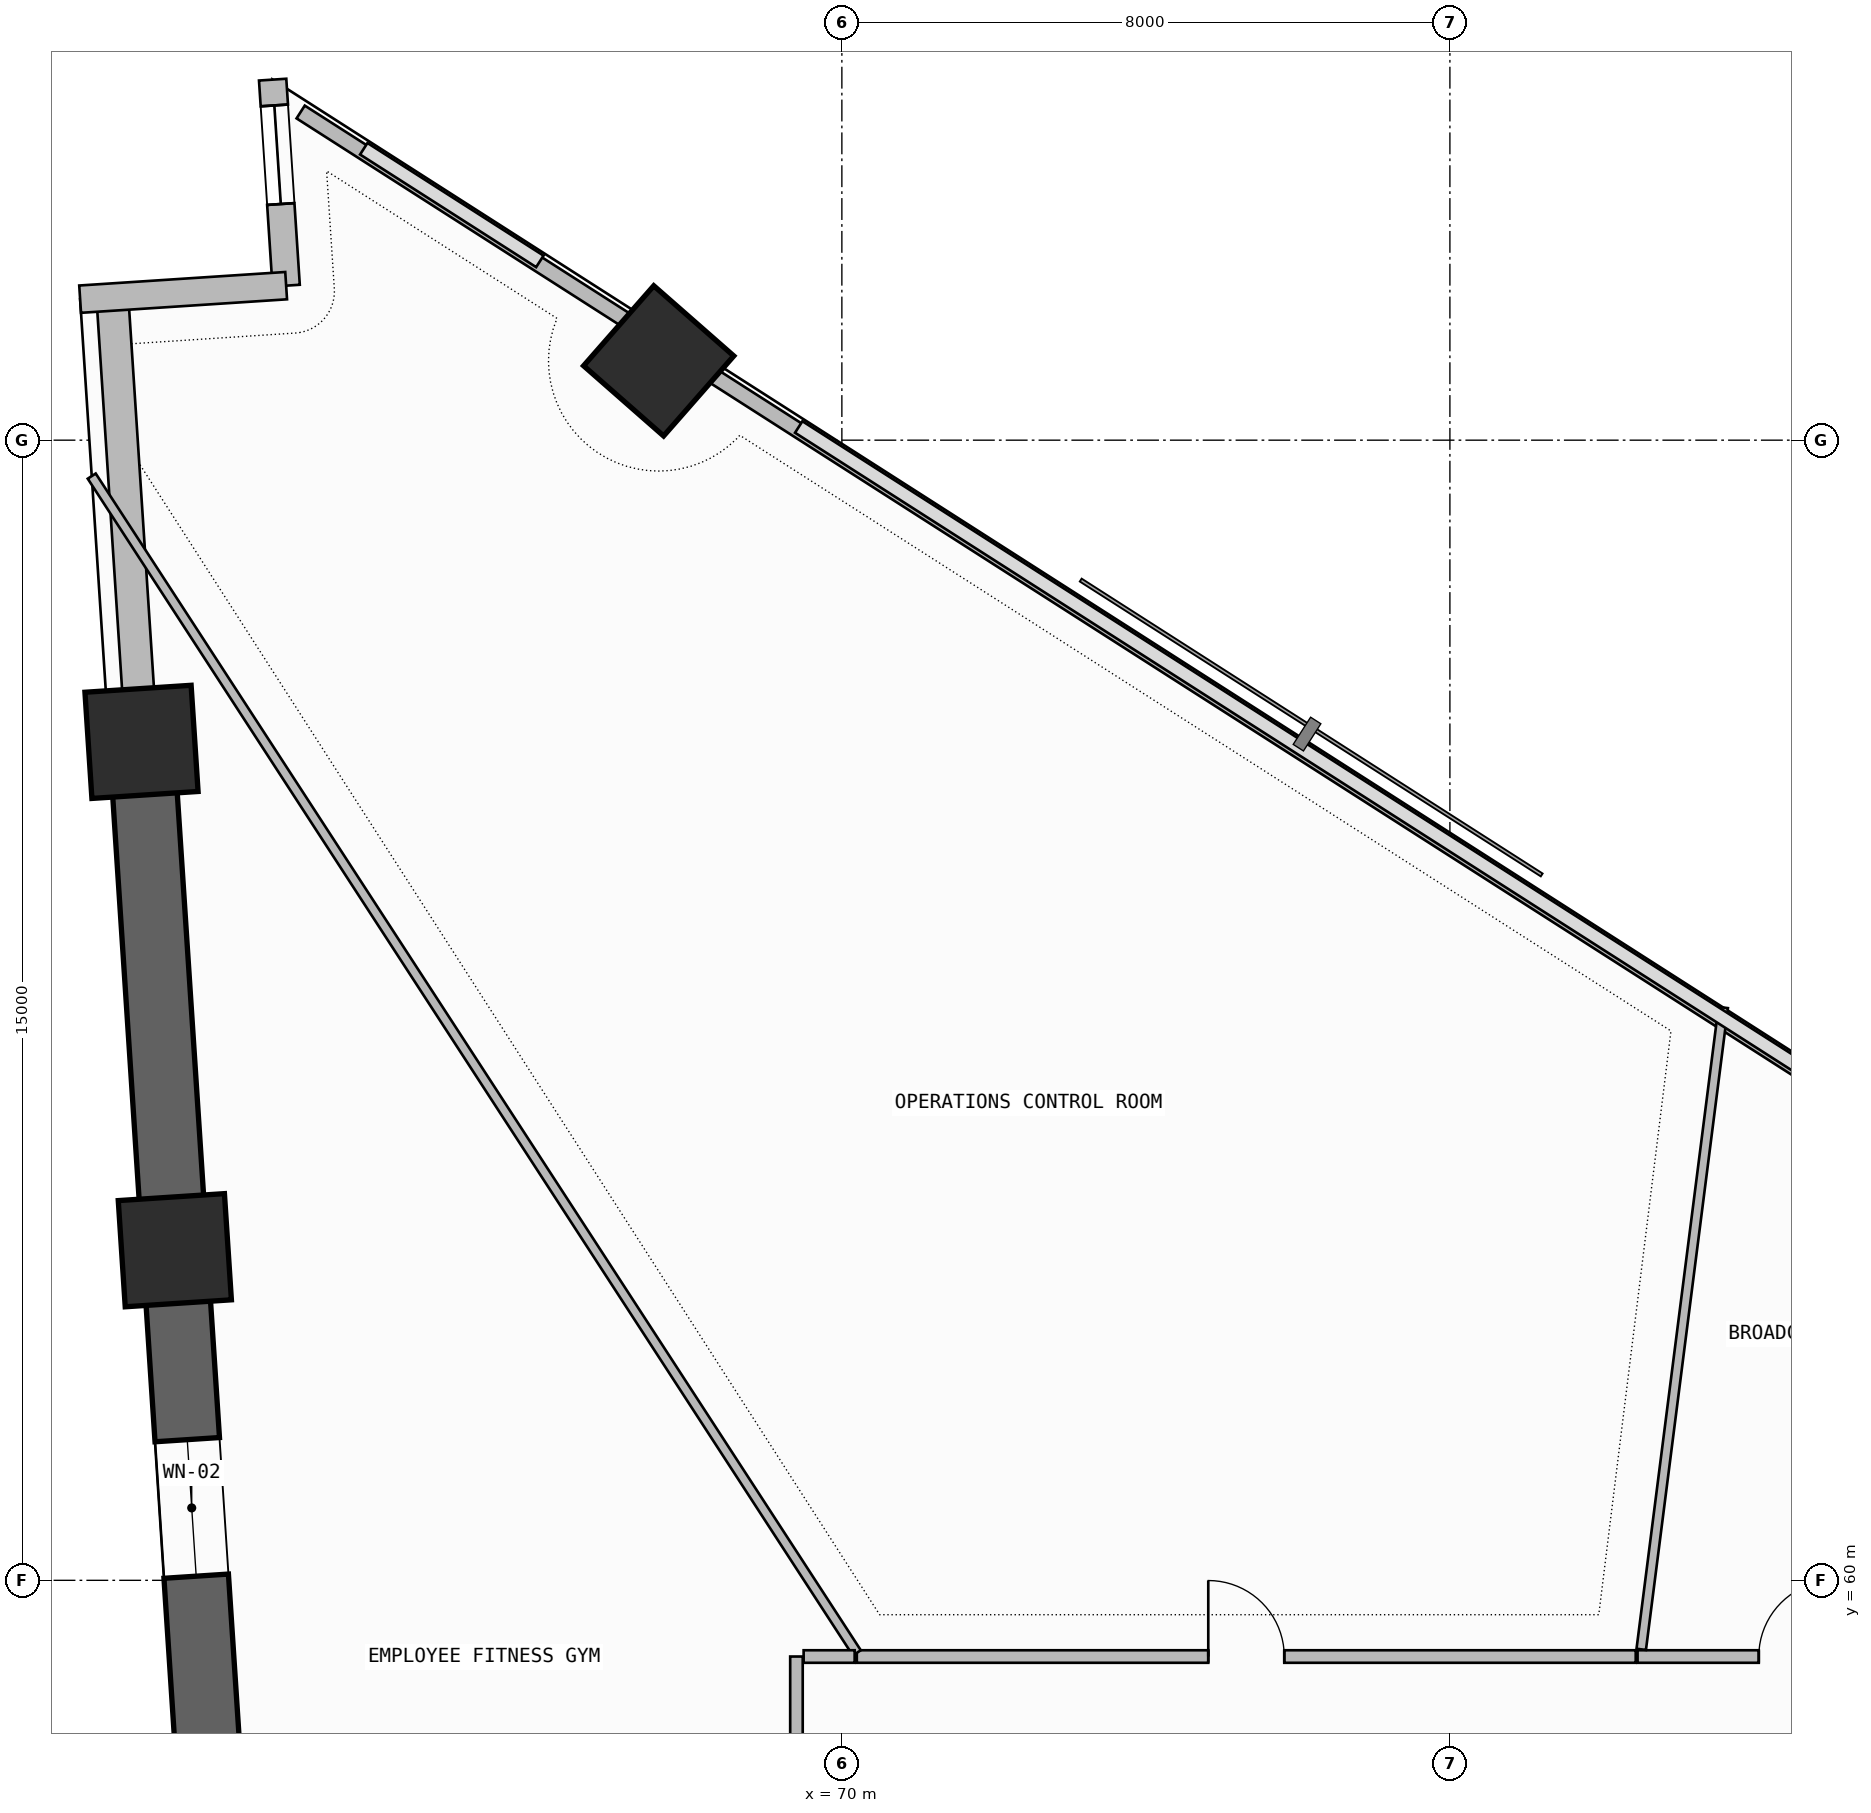
"""IFC4 building model, lengths in metres.
Left out: names, types, materials, properties, quantities, classifications, styles, units other than length and angle.
Written with IfcOpenShell. Run it as: python <this file> out.ifc"""

import sys

from ifc_helpers import new_model, si_unit, direction, frame, frame_2d, origin, origin_2d, place, context, subcontext, project, spatial, rectangle, extrude, element, fill, save


model = new_model("IFC4")
c1 = context("Model", 3, precision=1e-05, world=origin(), true_north=direction((0.0, 1.0)))
c2 = subcontext(c1, "Body", "Model", "MODEL_VIEW")
j1 = project(units=[si_unit("LENGTHUNIT", "METRE"), si_unit("PLANEANGLEUNIT", "RADIAN")], contexts=[c1])
p1 = place(None, origin())
s1 = spatial("IfcSite", under=j1, at=p1, CompositionType="ELEMENT")
p2 = place(p1, origin())
s2 = spatial("IfcBuilding", under=s1, at=p2, CompositionType="ELEMENT")
p3 = place(p2, frame((0.0, 0.0, 77.7)))
s3 = spatial("IfcBuildingStorey", under=s2, at=p3, CompositionType="ELEMENT", Elevation=77.7)
for number, where, z_axis, x_axis in (
    (1, (67.59, 76.043, 0.0), (0.0, 0.0, 1.0), (0.659, 0.752, 0.0)),
    (2, (60.785, 71.031, 0.0), (0.0, 0.0, 1.0), (-0.065, 0.998, 0.0)),
    (3, (61.224, 64.343, 0.0), (0.0, 0.0, 1.0), (-0.065, 0.998, 0.0)),
):
    element("IfcColumn", number, at=place(p3, frame(where, z_axis=z_axis, x_axis=x_axis)), inside=s3, PredefinedType="COLUMN", context=c2, shape_type="SweptSolid", body=[
        extrude(rectangle(XDim=1.4, YDim=1.4, at=origin_2d()), origin(), (0.0, 0.0, 1.0), 3.6),
    ])
p4 = place(p3, frame((60.402, 76.883, 0.0), z_axis=(0.0, 0.0, 1.0), x_axis=(0.065402662459, -0.997858953832, 0.0)))
e4 = element("IfcWall", 4, at=p4, inside=s3, PredefinedType="SOLIDWALL", context=c2, shape_type="SweptSolid", body=[
    extrude(rectangle(XDim=5.864, YDim=0.42, at=frame_2d((2.932, 0.0))), origin(), (0.0, 0.0, 1.0), 2.725),
])
p5 = place(p3, frame((60.785, 71.031, -0.26), z_axis=(0.0, 0.0, 1.0), x_axis=(0.065409824833, -0.997858484363, 0.0)))
e5 = element("IfcWall", 5, at=p5, inside=s3, PredefinedType="SHEAR", context=c2, shape_type="SweptSolid", body=[
    extrude(rectangle(XDim=21.783, YDim=0.85, at=frame_2d((10.891, 0.0))), origin(), (0.0, 0.0, 1.0), 3.6),
])
p6 = place(p5, frame((9.2, 0.0, 1.2)))
e6 = element("IfcOpeningElement", 6, at=p6, cuts=e5, PredefinedType="OPENING", context=c2, shape_type="SweptSolid", body=[
    extrude(rectangle(XDim=1.8, YDim=0.9, at=frame_2d((0.9, 0.45))), frame((0.0, 0.435, 0.0), z_axis=(0.0, -1.0, 0.0), x_axis=(1.0, 0.0, 0.0)), (0.0, 0.0, 1.0), 0.87),
])
p7 = place(p3, frame((62.511, 79.743, 0.0), z_axis=(0.0, 0.0, 1.0), x_axis=(0.065337885661, -0.997863197386, 0.0)))
e7 = element("IfcWall", 7, at=p7, inside=s3, PredefinedType="SOLIDWALL", context=c2, shape_type="SweptSolid", body=[
    extrude(rectangle(XDim=2.717, YDim=0.36, at=frame_2d((1.358, 0.0))), origin(), (0.0, 0.0, 1.0), 3.34),
])
p8 = place(p7, frame((0.34, 0.0, 0.45)))
e8 = element("IfcOpeningElement", 8, at=p8, cuts=e7, PredefinedType="OPENING", context=c2, shape_type="SweptSolid", body=[
    extrude(rectangle(XDim=1.3, YDim=2.4, at=frame_2d((0.65, 1.2))), frame((0.0, 0.19, 0.0), z_axis=(0.0, -1.0, 0.0), x_axis=(1.0, 0.0, 0.0)), (0.0, 0.0, 1.0), 0.38),
])
p9 = place(p3, frame((62.688, 77.033, 0.0), z_axis=(0.0, 0.0, 1.0), x_axis=(-0.99785694905, -0.065433242561, 0.0)))
e9 = element("IfcWall", 9, at=p9, inside=s3, PredefinedType="SOLIDWALL", context=c2, shape_type="SweptSolid", body=[
    extrude(rectangle(XDim=2.716, YDim=0.36, at=frame_2d((1.358, 0.0))), origin(), (0.0, 0.0, 1.0), 3.34),
])
p10 = place(p3, frame((84.682, 65.372, 0.0), z_axis=(0.0, 0.0, 1.0), x_axis=(-0.842418773655, 0.538823356763, 0.0)))
e10 = element("IfcWall", 10, at=p10, inside=s3, PredefinedType="PARAPET", context=c2, shape_type="SweptSolid", body=[
    extrude(rectangle(XDim=19.612, YDim=0.2, at=frame_2d((9.806, 0.0))), origin(), (0.0, 0.0, 1.0), 1.15),
])
p11 = place(p3, frame((67.257, 76.518, 0.0), z_axis=(0.0, 0.0, 1.0), x_axis=(-0.842403631411, 0.538847030042, 0.0)))
e11 = element("IfcWall", 11, at=p11, inside=s3, PredefinedType="PARAPET", context=c2, shape_type="SweptSolid", body=[
    extrude(rectangle(XDim=5.196, YDim=0.2, at=frame_2d((2.598, 0.0))), origin(), (0.0, 0.0, 1.0), 1.15),
])
p12 = place(p3, frame((88.209, 58.998, 0.0), z_axis=(0.0, 0.0, 1.0), x_axis=(-1.0, 0.0, 0.0)))
e12 = element("IfcWall", 12, at=p12, inside=s3, PredefinedType="PARTITIONING", context=c2, shape_type="SweptSolid", body=[
    extrude(rectangle(XDim=7.74, YDim=0.165, at=frame_2d((3.87, 0.0))), origin(), (0.0, 0.0, 1.0), 2.725),
])
p13 = place(p12, frame((5.146, 0.0, 0.0)))
e13 = element("IfcOpeningElement", 13, at=p13, cuts=e12, PredefinedType="OPENING", context=c2, shape_type="SweptSolid", body=[
    extrude(rectangle(XDim=1.0, YDim=2.2, at=frame_2d((0.5, 1.1))), frame((0.0, 0.093, 0.0), z_axis=(0.0, -1.0, 0.0), x_axis=(1.0, 0.0, 0.0)), (0.0, 0.0, 1.0), 0.185),
])
p14 = place(p3, frame((80.517, 59.092, 0.0), z_axis=(0.0, 0.0, 1.0), x_axis=(0.126709943005, 0.991939811855, 0.0)))
e14 = element("IfcWall", 14, at=p14, inside=s3, PredefinedType="PARTITIONING", context=c2, shape_type="SweptSolid", body=[
    extrude(rectangle(XDim=8.512, YDim=0.125, at=frame_2d((4.256, 0.0))), origin(), (0.0, 0.0, 1.0), 2.875),
])
p15 = place(p3, frame((80.445, 58.998, 0.0), z_axis=(0.0, 0.0, 1.0), x_axis=(-1.0, 0.0, 0.0)))
e15 = element("IfcWall", 15, at=p15, inside=s3, PredefinedType="PARTITIONING", context=c2, shape_type="SweptSolid", body=[
    extrude(rectangle(XDim=10.248, YDim=0.165, at=frame_2d((5.124, 0.0))), origin(), (0.0, 0.0, 1.0), 2.725),
])
p16 = place(p15, frame((4.624, 0.0, 0.0)))
e16 = element("IfcOpeningElement", 16, at=p16, cuts=e15, PredefinedType="OPENING", context=c2, shape_type="SweptSolid", body=[
    extrude(rectangle(XDim=1.0, YDim=2.2, at=frame_2d((0.5, 1.1))), frame((0.0, 0.093, 0.0), z_axis=(0.0, -1.0, 0.0), x_axis=(1.0, 0.0, 0.0)), (0.0, 0.0, 1.0), 0.185),
])
p17 = place(p3, frame((70.197, 59.046, 0.0), z_axis=(0.0, 0.0, 1.0), x_axis=(-0.54511427763, 0.838361750275, 0.0)))
e17 = element("IfcWall", 17, at=p17, inside=s3, PredefinedType="PARTITIONING", context=c2, shape_type="SweptSolid", body=[
    extrude(rectangle(XDim=18.467, YDim=0.125, at=frame_2d((9.233, 0.0))), origin(), (0.0, 0.0, 1.0), 2.725),
])
p18 = place(p3, frame((69.403, 58.998, 0.0), z_axis=(0.0, 0.0, 1.0), x_axis=(0.0, -1.0, 0.0)))
e18 = element("IfcWall", 18, at=p18, inside=s3, PredefinedType="PARTITIONING", context=c2, shape_type="SweptSolid", body=[
    extrude(rectangle(XDim=10.431, YDim=0.165, at=frame_2d((5.215, 0.0))), origin(), (0.0, 0.0, 1.0), 2.725),
])
p19 = place(p18, frame((4.716, 0.0, 0.0)))
e19 = element("IfcOpeningElement", 19, at=p19, cuts=e18, PredefinedType="OPENING", context=c2, shape_type="SweptSolid", body=[
    extrude(rectangle(XDim=1.0, YDim=2.2, at=frame_2d((0.5, 1.1))), frame((0.0, 0.093, 0.0), z_axis=(0.0, -1.0, 0.0), x_axis=(1.0, 0.0, 0.0)), (0.0, 0.0, 1.0), 0.185),
])
p20 = place(p3, frame((70.168, 58.998, 0.0), z_axis=(0.0, 0.0, 1.0), x_axis=(-1.0, 0.0, 0.0)))
e20 = element("IfcWall", 20, at=p20, inside=s3, PredefinedType="PARTITIONING", context=c2, shape_type="SweptSolid", body=[
    extrude(rectangle(XDim=0.671, YDim=0.165, at=frame_2d((0.335, 0.0))), origin(), (0.0, 0.0, 1.0), 2.725),
])
p21 = place(p6, origin())
e21 = element("IfcWindow", 21, at=p21, inside=s3, PartitioningType="SINGLE_PANEL", PredefinedType="WINDOW", context=c2, shape_type="SweptSolid", body=[
    extrude(rectangle(XDim=1.8, YDim=0.9, at=frame_2d((0.9, 0.45))), frame((0.0, 0.03, 0.0), z_axis=(0.0, -1.0, 0.0), x_axis=(1.0, 0.0, 0.0)), (0.0, 0.0, 1.0), 0.06),
])
fill(e6, e21)
p22 = place(p8, origin())
e22 = element("IfcWindow", 22, at=p22, inside=s3, PartitioningType="SINGLE_PANEL", PredefinedType="WINDOW", context=c2, shape_type="SweptSolid", body=[
    extrude(rectangle(XDim=1.3, YDim=2.4, at=frame_2d((0.65, 1.2))), frame((0.0, 0.03, 0.0), z_axis=(0.0, -1.0, 0.0), x_axis=(1.0, 0.0, 0.0)), (0.0, 0.0, 1.0), 0.06),
])
fill(e8, e22)
p23 = place(p13, frame((1.0, 0.0, 0.0), z_axis=(0.0, 0.0, 1.0), x_axis=(-1.0, 0.0, 0.0)))
e23 = element("IfcDoor", 23, at=p23, inside=s3, OperationType="SINGLE_SWING_RIGHT", PredefinedType="DOOR", context=c2, shape_type="SweptSolid", body=[
    extrude(rectangle(XDim=1.0, YDim=2.2, at=frame_2d((0.5, 1.1))), frame((0.0, 0.025, 0.0), z_axis=(0.0, -1.0, 0.0), x_axis=(1.0, 0.0, 0.0)), (0.0, 0.0, 1.0), 0.05),
])
fill(e13, e23)
p24 = place(p16, frame((1.0, 0.0, 0.0), z_axis=(0.0, 0.0, 1.0), x_axis=(-1.0, 0.0, 0.0)))
e24 = element("IfcDoor", 24, at=p24, inside=s3, OperationType="SINGLE_SWING_LEFT", PredefinedType="DOOR", context=c2, shape_type="SweptSolid", body=[
    extrude(rectangle(XDim=1.0, YDim=2.2, at=frame_2d((0.5, 1.1))), frame((0.0, 0.025, 0.0), z_axis=(0.0, -1.0, 0.0), x_axis=(1.0, 0.0, 0.0)), (0.0, 0.0, 1.0), 0.05),
])
fill(e16, e24)
save(model, sys.argv[1])
